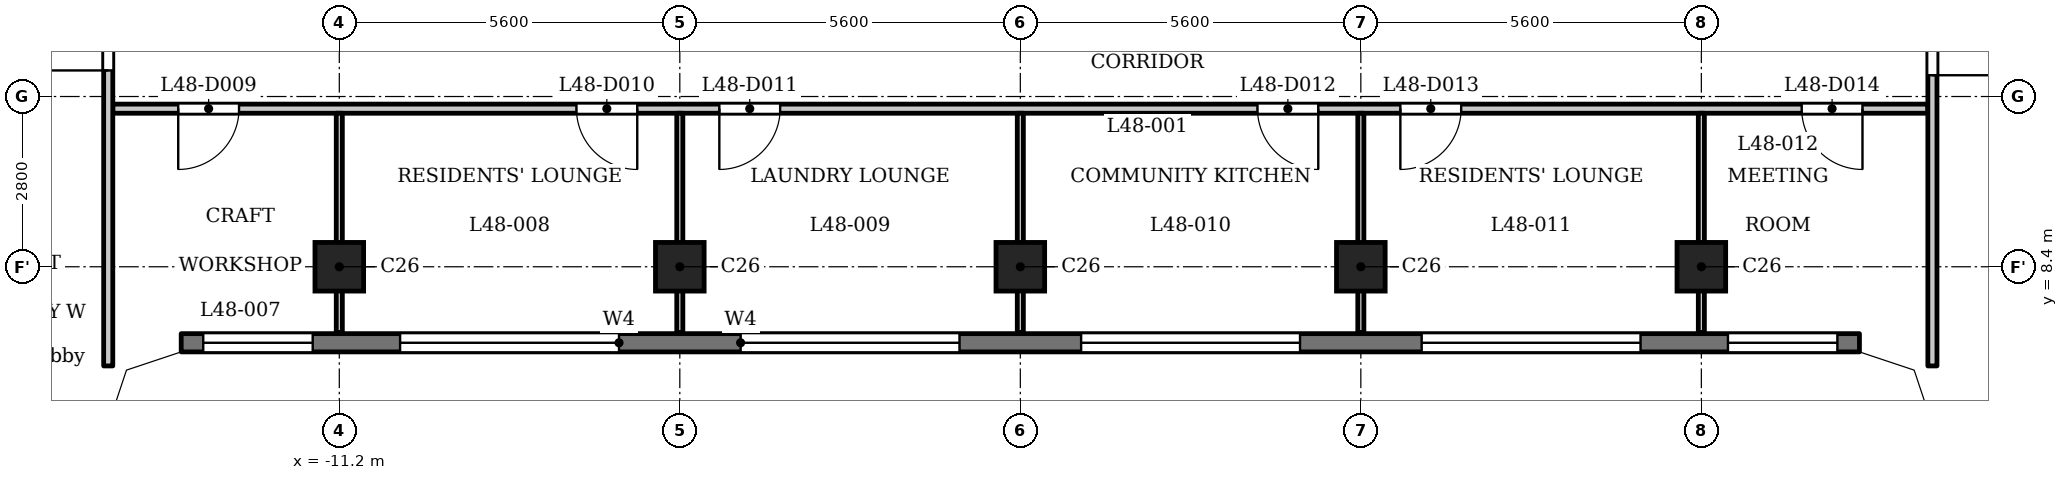
"""IFC4 building model, lengths in metres.
Left out: names, types, materials, properties, quantities, classifications, styles, units other than length and angle.
Written with IfcOpenShell. Run it as: python <this file> out.ifc"""

import sys

from ifc_helpers import new_model, si_unit, direction, frame, frame_2d, origin, origin_2d, place, context, subcontext, project, spatial, polyline, rectangle, outline, extrude, element, fill, save


model = new_model("IFC4")
c1 = context("Model", 3, precision=1e-05, world=origin(), true_north=direction((0.0, 1.0)))
c2 = subcontext(c1, "Body", "Model", "MODEL_VIEW")
j1 = project(units=[si_unit("LENGTHUNIT", "METRE"), si_unit("PLANEANGLEUNIT", "RADIAN")], contexts=[c1])
p1 = place(None, origin())
s1 = spatial("IfcSite", under=j1, at=p1, CompositionType="ELEMENT")
p2 = place(p1, origin())
s2 = spatial("IfcBuilding", under=s1, at=p2, CompositionType="ELEMENT")
p3 = place(p2, frame((0.0, 0.0, 188.9)))
s3 = spatial("IfcBuildingStorey", under=s2, at=p3, CompositionType="ELEMENT", Elevation=188.9)
for number, where, z_axis, x_axis in (
    (1, (-11.2, 8.4, 0.0), (0.0, 0.0, 1.0), (1.0, 0.0, 0.0)),
    (2, (-5.6, 8.4, 0.0), (0.0, 0.0, 1.0), (1.0, 0.0, 0.0)),
    (3, (0.0, 8.4, 0.0), (0.0, 0.0, 1.0), (1.0, 0.0, 0.0)),
    (4, (5.6, 8.4, 0.0), (0.0, 0.0, 1.0), (1.0, 0.0, 0.0)),
    (5, (11.2, 8.4, 0.0), (0.0, 0.0, 1.0), (1.0, 0.0, 0.0)),
):
    element("IfcColumn", number, at=place(p3, frame(where, z_axis=z_axis, x_axis=x_axis)), inside=s3, PredefinedType="COLUMN", context=c2, shape_type="SweptSolid", body=[
        extrude(rectangle(XDim=0.8, YDim=0.8, at=origin_2d()), origin(), (0.0, 0.0, 1.0), 3.5),
    ])
p4 = place(p3, frame((-13.8, 7.15, 0.0), z_axis=(0.0, 0.0, 1.0), x_axis=(1.0, 0.0, 0.0)))
e6 = element("IfcWall", 6, at=p4, inside=s3, PredefinedType="SOLIDWALL", context=c2, shape_type="SweptSolid", body=[
    extrude(rectangle(XDim=27.6, YDim=0.3, at=frame_2d((13.8, 0.0))), origin(), (0.0, 0.0, 1.0), 3.2),
])
p5 = place(p4, frame((0.363, 0.0, 0.9)))
e7 = element("IfcOpeningElement", 7, at=p5, cuts=e6, PredefinedType="OPENING", context=c2, shape_type="SweptSolid", body=[
    extrude(rectangle(XDim=1.8, YDim=1.25, at=frame_2d((0.9, 0.625))), frame((0.0, 0.16, 0.0), z_axis=(0.0, -1.0, 0.0), x_axis=(1.0, 0.0, 0.0)), (0.0, 0.0, 1.0), 0.32),
])
p6 = place(p4, frame((3.6, 0.0, 1.2)))
e8 = element("IfcOpeningElement", 8, at=p6, cuts=e6, PredefinedType="OPENING", context=c2, shape_type="SweptSolid", body=[
    extrude(rectangle(XDim=3.6, YDim=0.95, at=frame_2d((1.8, 0.475))), frame((0.0, 0.16, 0.0), z_axis=(0.0, -1.0, 0.0), x_axis=(1.0, 0.0, 0.0)), (0.0, 0.0, 1.0), 0.32),
])
p7 = place(p4, frame((9.2, 0.0, 1.2)))
e9 = element("IfcOpeningElement", 9, at=p7, cuts=e6, PredefinedType="OPENING", context=c2, shape_type="SweptSolid", body=[
    extrude(rectangle(XDim=3.6, YDim=0.95, at=frame_2d((1.8, 0.475))), frame((0.0, 0.16, 0.0), z_axis=(0.0, -1.0, 0.0), x_axis=(1.0, 0.0, 0.0)), (0.0, 0.0, 1.0), 0.32),
])
p8 = place(p4, frame((14.8, 0.0, 1.2)))
e10 = element("IfcOpeningElement", 10, at=p8, cuts=e6, PredefinedType="OPENING", context=c2, shape_type="SweptSolid", body=[
    extrude(rectangle(XDim=3.6, YDim=0.95, at=frame_2d((1.8, 0.475))), frame((0.0, 0.16, 0.0), z_axis=(0.0, -1.0, 0.0), x_axis=(1.0, 0.0, 0.0)), (0.0, 0.0, 1.0), 0.32),
])
p9 = place(p4, frame((20.4, 0.0, 1.2)))
e11 = element("IfcOpeningElement", 11, at=p9, cuts=e6, PredefinedType="OPENING", context=c2, shape_type="SweptSolid", body=[
    extrude(rectangle(XDim=3.6, YDim=0.95, at=frame_2d((1.8, 0.475))), frame((0.0, 0.16, 0.0), z_axis=(0.0, -1.0, 0.0), x_axis=(1.0, 0.0, 0.0)), (0.0, 0.0, 1.0), 0.32),
])
p10 = place(p4, frame((25.438, 0.0, 0.9)))
e12 = element("IfcOpeningElement", 12, at=p10, cuts=e6, PredefinedType="OPENING", context=c2, shape_type="SweptSolid", body=[
    extrude(rectangle(XDim=1.8, YDim=1.25, at=frame_2d((0.9, 0.625))), frame((0.0, 0.16, 0.0), z_axis=(0.0, -1.0, 0.0), x_axis=(1.0, 0.0, 0.0)), (0.0, 0.0, 1.0), 0.32),
])
p11 = place(p3, frame((-14.925, 11.0, 0.0), z_axis=(0.0, 0.0, 1.0), x_axis=(1.0, 0.0, 0.0)))
e13 = element("IfcWall", 13, at=p11, inside=s3, PredefinedType="PARTITIONING", context=c2, shape_type="SweptSolid", body=[
    extrude(rectangle(XDim=29.85, YDim=0.15, at=frame_2d((14.925, 0.0))), origin(), (0.0, 0.0, 1.0), 3.2),
])
p12 = place(p11, frame((1.076, 0.0, 0.0)))
e14 = element("IfcOpeningElement", 14, at=p12, cuts=e13, PredefinedType="OPENING", context=c2, shape_type="SweptSolid", body=[
    extrude(rectangle(XDim=1.0, YDim=2.1, at=frame_2d((0.5, 1.05))), frame((0.0, 0.085, 0.0), z_axis=(0.0, -1.0, 0.0), x_axis=(1.0, 0.0, 0.0)), (0.0, 0.0, 1.0), 0.17),
])
p13 = place(p11, frame((7.625, 0.0, 0.0)))
e15 = element("IfcOpeningElement", 15, at=p13, cuts=e13, PredefinedType="OPENING", context=c2, shape_type="SweptSolid", body=[
    extrude(rectangle(XDim=1.0, YDim=2.1, at=frame_2d((0.5, 1.05))), frame((0.0, 0.085, 0.0), z_axis=(0.0, -1.0, 0.0), x_axis=(1.0, 0.0, 0.0)), (0.0, 0.0, 1.0), 0.17),
])
p14 = place(p11, frame((9.975, 0.0, 0.0)))
e16 = element("IfcOpeningElement", 16, at=p14, cuts=e13, PredefinedType="OPENING", context=c2, shape_type="SweptSolid", body=[
    extrude(rectangle(XDim=1.0, YDim=2.1, at=frame_2d((0.5, 1.05))), frame((0.0, 0.085, 0.0), z_axis=(0.0, -1.0, 0.0), x_axis=(1.0, 0.0, 0.0)), (0.0, 0.0, 1.0), 0.17),
])
p15 = place(p11, frame((18.825, 0.0, 0.0)))
e17 = element("IfcOpeningElement", 17, at=p15, cuts=e13, PredefinedType="OPENING", context=c2, shape_type="SweptSolid", body=[
    extrude(rectangle(XDim=1.0, YDim=2.1, at=frame_2d((0.5, 1.05))), frame((0.0, 0.085, 0.0), z_axis=(0.0, -1.0, 0.0), x_axis=(1.0, 0.0, 0.0)), (0.0, 0.0, 1.0), 0.17),
])
p16 = place(p11, frame((21.175, 0.0, 0.0)))
e18 = element("IfcOpeningElement", 18, at=p16, cuts=e13, PredefinedType="OPENING", context=c2, shape_type="SweptSolid", body=[
    extrude(rectangle(XDim=1.0, YDim=2.1, at=frame_2d((0.5, 1.05))), frame((0.0, 0.085, 0.0), z_axis=(0.0, -1.0, 0.0), x_axis=(1.0, 0.0, 0.0)), (0.0, 0.0, 1.0), 0.17),
])
p17 = place(p11, frame((27.775, 0.0, 0.0)))
e19 = element("IfcOpeningElement", 19, at=p17, cuts=e13, PredefinedType="OPENING", context=c2, shape_type="SweptSolid", body=[
    extrude(rectangle(XDim=1.0, YDim=2.1, at=frame_2d((0.5, 1.05))), frame((0.0, 0.085, 0.0), z_axis=(0.0, -1.0, 0.0), x_axis=(1.0, 0.0, 0.0)), (0.0, 0.0, 1.0), 0.17),
])
p18 = place(p3, frame((-15.0, 6.769, 0.0), z_axis=(0.0, 0.0, 1.0), x_axis=(0.0, 1.0, 0.0)))
e20 = element("IfcWall", 20, at=p18, inside=s3, PredefinedType="PARTITIONING", context=c2, shape_type="SweptSolid", body=[
    extrude(rectangle(XDim=6.356, YDim=0.15, at=frame_2d((3.178, 0.0))), origin(), (0.0, 0.0, 1.0), 3.2),
])
p19 = place(p18, frame((4.86, 0.0, 0.0)))
e21 = element("IfcOpeningElement", 21, at=p19, cuts=e20, PredefinedType="OPENING", context=c2, shape_type="SweptSolid", body=[
    extrude(rectangle(XDim=1.0, YDim=2.1, at=frame_2d((0.5, 1.05))), frame((0.0, 0.085, 0.0), z_axis=(0.0, -1.0, 0.0), x_axis=(1.0, 0.0, 0.0)), (0.0, 0.0, 1.0), 0.17),
])
for number, where, z_axis, x_axis in (
    (22, (-11.2, 7.32, 0.0), (0.0, 0.0, 1.0), (0.0, 1.0, 0.0)),
    (23, (-5.6, 7.32, 0.0), (0.0, 0.0, 1.0), (0.0, 1.0, 0.0)),
    (24, (0.0, 7.32, 0.0), (0.0, 0.0, 1.0), (0.0, 1.0, 0.0)),
    (25, (5.6, 7.32, 0.0), (0.0, 0.0, 1.0), (0.0, 1.0, 0.0)),
    (26, (11.2, 7.32, 0.0), (0.0, 0.0, 1.0), (0.0, 1.0, 0.0)),
):
    element("IfcWall", number, at=place(p3, frame(where, z_axis=z_axis, x_axis=x_axis)), inside=s3, PredefinedType="PARTITIONING", context=c2, shape_type="SweptSolid", body=[
        extrude(rectangle(XDim=3.605, YDim=0.1, at=frame_2d((1.802, 0.0))), origin(), (0.0, 0.0, 1.0), 3.2),
    ])
p20 = place(p3, frame((15.0, 6.769, 0.0), z_axis=(0.0, 0.0, 1.0), x_axis=(0.0, 1.0, 0.0)))
e27 = element("IfcWall", 27, at=p20, inside=s3, PredefinedType="PARTITIONING", context=c2, shape_type="SweptSolid", body=[
    extrude(rectangle(XDim=6.356, YDim=0.15, at=frame_2d((3.178, 0.0))), origin(), (0.0, 0.0, 1.0), 3.2),
])
p21 = place(p20, frame((4.781, 0.0, 0.0)))
e28 = element("IfcOpeningElement", 28, at=p21, cuts=e27, PredefinedType="OPENING", context=c2, shape_type="SweptSolid", body=[
    extrude(rectangle(XDim=1.0, YDim=2.1, at=frame_2d((0.5, 1.05))), frame((0.0, 0.085, 0.0), z_axis=(0.0, -1.0, 0.0), x_axis=(1.0, 0.0, 0.0)), (0.0, 0.0, 1.0), 0.17),
])
p22 = place(p3, origin())
e29 = element("IfcWall", 29, at=p22, inside=s3, PredefinedType="SOLIDWALL", context=c2, shape_type="SweptSolid", body=[
    extrude(outline(polyline([(-13.849, 7.3), (-14.937, 6.937), (-15.3, 5.849), (-15.3, 5.8), (-15.0, 5.8), (-14.7, 6.7), (-13.8, 7.0), (-13.8, 7.3), (-13.849, 7.3)])), origin(), (0.0, 0.0, 1.0), 3.2),
])
e30 = element("IfcWall", 30, at=p22, inside=s3, PredefinedType="SOLIDWALL", context=c2, shape_type="SweptSolid", body=[
    extrude(outline(polyline([(14.937, 6.937), (13.849, 7.3), (13.8, 7.3), (13.8, 7.0), (14.7, 6.7), (15.0, 5.8), (15.3, 5.8), (15.3, 5.849), (14.937, 6.937)])), origin(), (0.0, 0.0, 1.0), 3.2),
])
p23 = place(p19, origin())
e31 = element("IfcDoor", 31, at=p23, inside=s3, OperationType="SINGLE_SWING_RIGHT", PredefinedType="DOOR", context=c2, shape_type="SweptSolid", body=[
    extrude(rectangle(XDim=1.0, YDim=2.1, at=frame_2d((0.5, 1.05))), frame((0.0, 0.025, 0.0), z_axis=(0.0, -1.0, 0.0), x_axis=(1.0, 0.0, 0.0)), (0.0, 0.0, 1.0), 0.05),
])
fill(e21, e31)
p24 = place(p21, origin())
e32 = element("IfcDoor", 32, at=p24, inside=s3, OperationType="SINGLE_SWING_LEFT", PredefinedType="DOOR", context=c2, shape_type="SweptSolid", body=[
    extrude(rectangle(XDim=1.0, YDim=2.1, at=frame_2d((0.5, 1.05))), frame((0.0, 0.025, 0.0), z_axis=(0.0, -1.0, 0.0), x_axis=(1.0, 0.0, 0.0)), (0.0, 0.0, 1.0), 0.05),
])
fill(e28, e32)
p25 = place(p12, origin())
e33 = element("IfcDoor", 33, at=p25, inside=s3, OperationType="SINGLE_SWING_LEFT", PredefinedType="DOOR", context=c2, shape_type="SweptSolid", body=[
    extrude(rectangle(XDim=1.0, YDim=2.1, at=frame_2d((0.5, 1.05))), frame((0.0, 0.025, 0.0), z_axis=(0.0, -1.0, 0.0), x_axis=(1.0, 0.0, 0.0)), (0.0, 0.0, 1.0), 0.05),
])
fill(e14, e33)
p26 = place(p13, origin())
e34 = element("IfcDoor", 34, at=p26, inside=s3, OperationType="SINGLE_SWING_RIGHT", PredefinedType="DOOR", context=c2, shape_type="SweptSolid", body=[
    extrude(rectangle(XDim=1.0, YDim=2.1, at=frame_2d((0.5, 1.05))), frame((0.0, 0.025, 0.0), z_axis=(0.0, -1.0, 0.0), x_axis=(1.0, 0.0, 0.0)), (0.0, 0.0, 1.0), 0.05),
])
fill(e15, e34)
p27 = place(p14, origin())
e35 = element("IfcDoor", 35, at=p27, inside=s3, OperationType="SINGLE_SWING_LEFT", PredefinedType="DOOR", context=c2, shape_type="SweptSolid", body=[
    extrude(rectangle(XDim=1.0, YDim=2.1, at=frame_2d((0.5, 1.05))), frame((0.0, 0.025, 0.0), z_axis=(0.0, -1.0, 0.0), x_axis=(1.0, 0.0, 0.0)), (0.0, 0.0, 1.0), 0.05),
])
fill(e16, e35)
p28 = place(p15, origin())
e36 = element("IfcDoor", 36, at=p28, inside=s3, OperationType="SINGLE_SWING_RIGHT", PredefinedType="DOOR", context=c2, shape_type="SweptSolid", body=[
    extrude(rectangle(XDim=1.0, YDim=2.1, at=frame_2d((0.5, 1.05))), frame((0.0, 0.025, 0.0), z_axis=(0.0, -1.0, 0.0), x_axis=(1.0, 0.0, 0.0)), (0.0, 0.0, 1.0), 0.05),
])
fill(e17, e36)
p29 = place(p16, origin())
e37 = element("IfcDoor", 37, at=p29, inside=s3, OperationType="SINGLE_SWING_LEFT", PredefinedType="DOOR", context=c2, shape_type="SweptSolid", body=[
    extrude(rectangle(XDim=1.0, YDim=2.1, at=frame_2d((0.5, 1.05))), frame((0.0, 0.025, 0.0), z_axis=(0.0, -1.0, 0.0), x_axis=(1.0, 0.0, 0.0)), (0.0, 0.0, 1.0), 0.05),
])
fill(e18, e37)
p30 = place(p17, origin())
e38 = element("IfcDoor", 38, at=p30, inside=s3, OperationType="SINGLE_SWING_RIGHT", PredefinedType="DOOR", context=c2, shape_type="SweptSolid", body=[
    extrude(rectangle(XDim=1.0, YDim=2.1, at=frame_2d((0.5, 1.05))), frame((0.0, 0.025, 0.0), z_axis=(0.0, -1.0, 0.0), x_axis=(1.0, 0.0, 0.0)), (0.0, 0.0, 1.0), 0.05),
])
fill(e19, e38)
p31 = place(p5, origin())
e39 = element("IfcWindow", 39, at=p31, inside=s3, PartitioningType="SINGLE_PANEL", PredefinedType="WINDOW", context=c2, shape_type="SweptSolid", body=[
    extrude(rectangle(XDim=1.8, YDim=1.25, at=frame_2d((0.9, 0.625))), frame((0.0, 0.03, 0.0), z_axis=(0.0, -1.0, 0.0), x_axis=(1.0, 0.0, 0.0)), (0.0, 0.0, 1.0), 0.06),
])
fill(e7, e39)
p32 = place(p6, origin())
e40 = element("IfcWindow", 40, at=p32, inside=s3, PartitioningType="SINGLE_PANEL", PredefinedType="WINDOW", context=c2, shape_type="SweptSolid", body=[
    extrude(rectangle(XDim=3.6, YDim=0.95, at=frame_2d((1.8, 0.475))), frame((0.0, 0.03, 0.0), z_axis=(0.0, -1.0, 0.0), x_axis=(1.0, 0.0, 0.0)), (0.0, 0.0, 1.0), 0.06),
])
fill(e8, e40)
p33 = place(p7, origin())
e41 = element("IfcWindow", 41, at=p33, inside=s3, PartitioningType="SINGLE_PANEL", PredefinedType="WINDOW", context=c2, shape_type="SweptSolid", body=[
    extrude(rectangle(XDim=3.6, YDim=0.95, at=frame_2d((1.8, 0.475))), frame((0.0, 0.03, 0.0), z_axis=(0.0, -1.0, 0.0), x_axis=(1.0, 0.0, 0.0)), (0.0, 0.0, 1.0), 0.06),
])
fill(e9, e41)
p34 = place(p8, origin())
e42 = element("IfcWindow", 42, at=p34, inside=s3, PartitioningType="SINGLE_PANEL", PredefinedType="WINDOW", context=c2, shape_type="SweptSolid", body=[
    extrude(rectangle(XDim=3.6, YDim=0.95, at=frame_2d((1.8, 0.475))), frame((0.0, 0.03, 0.0), z_axis=(0.0, -1.0, 0.0), x_axis=(1.0, 0.0, 0.0)), (0.0, 0.0, 1.0), 0.06),
])
fill(e10, e42)
p35 = place(p9, origin())
e43 = element("IfcWindow", 43, at=p35, inside=s3, PartitioningType="SINGLE_PANEL", PredefinedType="WINDOW", context=c2, shape_type="SweptSolid", body=[
    extrude(rectangle(XDim=3.6, YDim=0.95, at=frame_2d((1.8, 0.475))), frame((0.0, 0.03, 0.0), z_axis=(0.0, -1.0, 0.0), x_axis=(1.0, 0.0, 0.0)), (0.0, 0.0, 1.0), 0.06),
])
fill(e11, e43)
p36 = place(p10, origin())
e44 = element("IfcWindow", 44, at=p36, inside=s3, PartitioningType="SINGLE_PANEL", PredefinedType="WINDOW", context=c2, shape_type="SweptSolid", body=[
    extrude(rectangle(XDim=1.8, YDim=1.25, at=frame_2d((0.9, 0.625))), frame((0.0, 0.03, 0.0), z_axis=(0.0, -1.0, 0.0), x_axis=(1.0, 0.0, 0.0)), (0.0, 0.0, 1.0), 0.06),
])
fill(e12, e44)
save(model, sys.argv[1])
